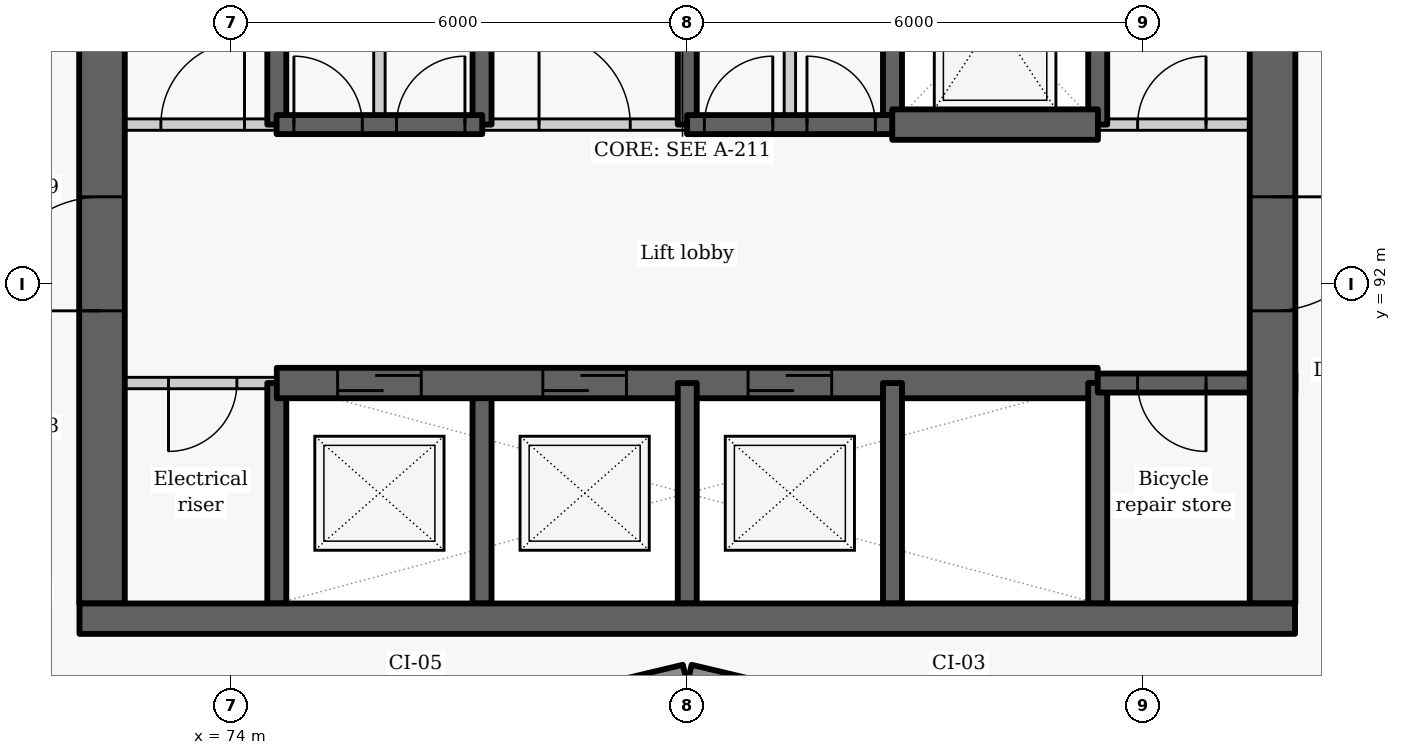
"""IFC4 building model, lengths in metres.
Left out: names, types, materials, properties, quantities, classifications, styles, units other than length and angle.
Written with IfcOpenShell. Run it as: python <this file> out.ifc"""

import sys

from ifc_helpers import new_model, si_unit, direction, frame, frame_2d, origin, place, context, subcontext, project, spatial, rectangle, extrude, element, fill, save


model = new_model("IFC4")
c1 = context("Model", 3, precision=1e-05, world=origin(), true_north=direction((0.0, 1.0)))
c2 = subcontext(c1, "Body", "Model", "MODEL_VIEW")
j1 = project(units=[si_unit("LENGTHUNIT", "METRE"), si_unit("PLANEANGLEUNIT", "RADIAN")], contexts=[c1])
p1 = place(None, origin())
s1 = spatial("IfcSite", under=j1, at=p1, CompositionType="ELEMENT")
p2 = place(p1, origin())
s2 = spatial("IfcBuilding", under=s1, at=p2, CompositionType="ELEMENT")
p3 = place(p2, frame((0.0, 0.0, 41.4)))
s3 = spatial("IfcBuildingStorey", under=s2, at=p3, CompositionType="ELEMENT", Elevation=41.4)
for number, where, z_axis, x_axis in (
    (1, (76.814, 86.119, 0.0), (0.0, 0.0, 1.0), (0.973, 0.232, 0.0)),
    (2, (80.029, 86.872, 0.0), (0.0, 0.0, 1.0), (0.973, -0.232, 0.0)),
):
    element("IfcWall", number, at=place(p3, frame(where, z_axis=z_axis, x_axis=x_axis)), inside=s3, PredefinedType="SOLIDWALL", context=c2, shape_type="SweptSolid", body=[
        extrude(rectangle(XDim=3.246, YDim=0.25, at=frame_2d((1.623, 0.0))), origin(), (0.0, 0.0, 1.0), 2.425),
    ])
p4 = place(p3, frame((74.6, 87.8, -0.275), z_axis=(0.0, 0.0, 1.0), x_axis=(0.0, 1.0, 0.0)))
e3 = element("IfcWall", 3, at=p4, inside=s3, PredefinedType="SHEAR", context=c2, shape_type="SweptSolid", body=[
    extrude(rectangle(XDim=2.9, YDim=0.25, at=frame_2d((1.45, 0.0))), origin(), (0.0, 0.0, 1.0), 3.3),
])
p5 = place(p3, frame((74.6, 94.1, -0.275), z_axis=(0.0, 0.0, 1.0), x_axis=(0.0, 1.0, 0.0)))
e4 = element("IfcWall", 4, at=p5, inside=s3, PredefinedType="SHEAR", context=c2, shape_type="SweptSolid", body=[
    extrude(rectangle(XDim=2.8, YDim=0.25, at=frame_2d((1.4, 0.0))), origin(), (0.0, 0.0, 1.0), 3.3),
])
p6 = place(p3, frame((74.6, 90.7, 0.0), z_axis=(0.0, 0.0, 1.0), x_axis=(-1.0, 0.0, 0.0)))
e5 = element("IfcWall", 5, at=p6, inside=s3, PredefinedType="PARTITIONING", context=c2, shape_type="SweptSolid", body=[
    extrude(rectangle(XDim=2.6, YDim=0.15, at=frame_2d((1.3, 0.0))), origin(), (0.0, 0.0, 1.0), 3.025),
])
p7 = place(p6, frame((0.525, 0.0, 0.0)))
e6 = element("IfcOpeningElement", 6, at=p7, cuts=e5, PredefinedType="OPENING", context=c2, shape_type="SweptSolid", body=[
    extrude(rectangle(XDim=0.9, YDim=2.1, at=frame_2d((0.45, 1.05))), frame((0.0, 0.085, 0.0), z_axis=(0.0, -1.0, 0.0), x_axis=(1.0, 0.0, 0.0)), (0.0, 0.0, 1.0), 0.17),
])
p8 = place(p3, frame((72.3, 87.8, -0.275), z_axis=(0.0, 0.0, 1.0), x_axis=(0.0, 1.0, 0.0)))
e7 = element("IfcWall", 7, at=p8, inside=s3, PredefinedType="SHEAR", context=c2, shape_type="SweptSolid", body=[
    extrude(rectangle(XDim=9.1, YDim=0.6, at=frame_2d((4.55, 0.0))), origin(), (0.0, 0.0, 1.0), 3.3),
])
p9 = place(p8, frame((3.85, 0.0, 0.275)))
e8 = element("IfcOpeningElement", 8, at=p9, cuts=e7, PredefinedType="OPENING", context=c2, shape_type="SweptSolid", body=[
    extrude(rectangle(XDim=1.5, YDim=2.1, at=frame_2d((0.75, 1.05))), frame((0.0, 0.31, 0.0), z_axis=(0.0, -1.0, 0.0), x_axis=(1.0, 0.0, 0.0)), (0.0, 0.0, 1.0), 0.62),
])
p10 = place(p3, frame((77.3, 87.8, -0.275), z_axis=(0.0, 0.0, 1.0), x_axis=(0.0, 1.0, 0.0)))
e9 = element("IfcWall", 9, at=p10, inside=s3, PredefinedType="SHEAR", context=c2, shape_type="SweptSolid", body=[
    extrude(rectangle(XDim=2.9, YDim=0.25, at=frame_2d((1.45, 0.0))), origin(), (0.0, 0.0, 1.0), 3.3),
])
p11 = place(p3, frame((77.3, 94.1, -0.275), z_axis=(0.0, 0.0, 1.0), x_axis=(0.0, 1.0, 0.0)))
e10 = element("IfcWall", 10, at=p11, inside=s3, PredefinedType="SHEAR", context=c2, shape_type="SweptSolid", body=[
    extrude(rectangle(XDim=2.8, YDim=0.25, at=frame_2d((1.4, 0.0))), origin(), (0.0, 0.0, 1.0), 3.3),
])
p12 = place(p3, frame((74.6, 90.7, -0.275), z_axis=(0.0, 0.0, 1.0), x_axis=(1.0, 0.0, 0.0)))
e11 = element("IfcWall", 11, at=p12, inside=s3, PredefinedType="SHEAR", context=c2, shape_type="SweptSolid", body=[
    extrude(rectangle(XDim=10.8, YDim=0.4, at=frame_2d((5.4, 0.0))), origin(), (0.0, 0.0, 1.0), 3.3),
])
p13 = place(p12, frame((0.8, 0.0, 0.275)))
e12 = element("IfcOpeningElement", 12, at=p13, cuts=e11, PredefinedType="OPENING", context=c2, shape_type="SweptSolid", body=[
    extrude(rectangle(XDim=1.1, YDim=2.1, at=frame_2d((0.55, 1.05))), frame((0.0, 0.21, 0.0), z_axis=(0.0, -1.0, 0.0), x_axis=(1.0, 0.0, 0.0)), (0.0, 0.0, 1.0), 0.42),
])
p14 = place(p12, frame((3.5, 0.0, 0.275)))
e13 = element("IfcOpeningElement", 13, at=p14, cuts=e11, PredefinedType="OPENING", context=c2, shape_type="SweptSolid", body=[
    extrude(rectangle(XDim=1.1, YDim=2.1, at=frame_2d((0.55, 1.05))), frame((0.0, 0.21, 0.0), z_axis=(0.0, -1.0, 0.0), x_axis=(1.0, 0.0, 0.0)), (0.0, 0.0, 1.0), 0.42),
])
p15 = place(p12, frame((6.2, 0.0, 0.275)))
e14 = element("IfcOpeningElement", 14, at=p15, cuts=e11, PredefinedType="OPENING", context=c2, shape_type="SweptSolid", body=[
    extrude(rectangle(XDim=1.1, YDim=2.1, at=frame_2d((0.55, 1.05))), frame((0.0, 0.21, 0.0), z_axis=(0.0, -1.0, 0.0), x_axis=(1.0, 0.0, 0.0)), (0.0, 0.0, 1.0), 0.42),
])
p16 = place(p3, frame((80.0, 87.8, -0.275), z_axis=(0.0, 0.0, 1.0), x_axis=(0.0, 1.0, 0.0)))
e15 = element("IfcWall", 15, at=p16, inside=s3, PredefinedType="SHEAR", context=c2, shape_type="SweptSolid", body=[
    extrude(rectangle(XDim=2.9, YDim=0.25, at=frame_2d((1.45, 0.0))), origin(), (0.0, 0.0, 1.0), 3.3),
])
p17 = place(p3, frame((80.0, 94.1, -0.275), z_axis=(0.0, 0.0, 1.0), x_axis=(0.0, 1.0, 0.0)))
e16 = element("IfcWall", 16, at=p17, inside=s3, PredefinedType="SHEAR", context=c2, shape_type="SweptSolid", body=[
    extrude(rectangle(XDim=2.8, YDim=0.25, at=frame_2d((1.4, 0.0))), origin(), (0.0, 0.0, 1.0), 3.3),
])
p18 = place(p3, frame((82.7, 87.8, -0.275), z_axis=(0.0, 0.0, 1.0), x_axis=(0.0, 1.0, 0.0)))
e17 = element("IfcWall", 17, at=p18, inside=s3, PredefinedType="SHEAR", context=c2, shape_type="SweptSolid", body=[
    extrude(rectangle(XDim=2.9, YDim=0.25, at=frame_2d((1.45, 0.0))), origin(), (0.0, 0.0, 1.0), 3.3),
])
p19 = place(p3, frame((82.7, 94.1, -0.275), z_axis=(0.0, 0.0, 1.0), x_axis=(0.0, 1.0, 0.0)))
e18 = element("IfcWall", 18, at=p19, inside=s3, PredefinedType="SHEAR", context=c2, shape_type="SweptSolid", body=[
    extrude(rectangle(XDim=2.8, YDim=0.25, at=frame_2d((1.4, 0.0))), origin(), (0.0, 0.0, 1.0), 3.3),
])
p20 = place(p3, frame((85.4, 87.8, -0.275), z_axis=(0.0, 0.0, 1.0), x_axis=(0.0, 1.0, 0.0)))
e19 = element("IfcWall", 19, at=p20, inside=s3, PredefinedType="SHEAR", context=c2, shape_type="SweptSolid", body=[
    extrude(rectangle(XDim=2.9, YDim=0.25, at=frame_2d((1.45, 0.0))), origin(), (0.0, 0.0, 1.0), 3.3),
])
p21 = place(p3, frame((85.4, 94.1, -0.275), z_axis=(0.0, 0.0, 1.0), x_axis=(0.0, 1.0, 0.0)))
e20 = element("IfcWall", 20, at=p21, inside=s3, PredefinedType="SHEAR", context=c2, shape_type="SweptSolid", body=[
    extrude(rectangle(XDim=2.8, YDim=0.25, at=frame_2d((1.4, 0.0))), origin(), (0.0, 0.0, 1.0), 3.3),
])
p22 = place(p3, frame((88.0, 90.7, -0.275), z_axis=(0.0, 0.0, 1.0), x_axis=(-1.0, 0.0, 0.0)))
e21 = element("IfcWall", 21, at=p22, inside=s3, PredefinedType="SHEAR", context=c2, shape_type="SweptSolid", body=[
    extrude(rectangle(XDim=2.6, YDim=0.25, at=frame_2d((1.3, 0.0))), origin(), (0.0, 0.0, 1.0), 3.3),
])
p23 = place(p22, frame((1.175, 0.0, 0.275)))
e22 = element("IfcOpeningElement", 22, at=p23, cuts=e21, PredefinedType="OPENING", context=c2, shape_type="SweptSolid", body=[
    extrude(rectangle(XDim=0.9, YDim=2.1, at=frame_2d((0.45, 1.05))), frame((0.0, 0.135, 0.0), z_axis=(0.0, -1.0, 0.0), x_axis=(1.0, 0.0, 0.0)), (0.0, 0.0, 1.0), 0.27),
])
p24 = place(p3, frame((87.7, 103.4, -0.275), z_axis=(0.0, 0.0, 1.0), x_axis=(0.0, -1.0, 0.0)))
e23 = element("IfcWall", 23, at=p24, inside=s3, PredefinedType="SHEAR", context=c2, shape_type="SweptSolid", body=[
    extrude(rectangle(XDim=15.6, YDim=0.6, at=frame_2d((7.8, 0.0))), origin(), (0.0, 0.0, 1.0), 3.3),
])
p25 = place(p24, frame((10.25, 0.0, 0.275)))
e24 = element("IfcOpeningElement", 24, at=p25, cuts=e23, PredefinedType="OPENING", context=c2, shape_type="SweptSolid", body=[
    extrude(rectangle(XDim=1.5, YDim=2.1, at=frame_2d((0.75, 1.05))), frame((0.0, 0.31, 0.0), z_axis=(0.0, -1.0, 0.0), x_axis=(1.0, 0.0, 0.0)), (0.0, 0.0, 1.0), 0.62),
])
p26 = place(p24, frame((2.7, 0.0, 0.275)))
e25 = element("IfcOpeningElement", 25, at=p26, cuts=e23, PredefinedType="OPENING", context=c2, shape_type="SweptSolid", body=[
    extrude(rectangle(XDim=1.1, YDim=2.1, at=frame_2d((0.55, 1.05))), frame((0.0, 0.31, 0.0), z_axis=(0.0, -1.0, 0.0), x_axis=(1.0, 0.0, 0.0)), (0.0, 0.0, 1.0), 0.62),
])
p27 = place(p3, frame((72.0, 94.1, 0.0), z_axis=(0.0, 0.0, 1.0), x_axis=(1.0, 0.0, 0.0)))
e26 = element("IfcWall", 26, at=p27, inside=s3, PredefinedType="PARTITIONING", context=c2, shape_type="SweptSolid", body=[
    extrude(rectangle(XDim=2.603, YDim=0.15, at=frame_2d((1.302, 0.0))), origin(), (0.0, 0.0, 1.0), 3.025),
])
p28 = place(p27, frame((1.075, 0.0, 0.0)))
e27 = element("IfcOpeningElement", 27, at=p28, cuts=e26, PredefinedType="OPENING", context=c2, shape_type="SweptSolid", body=[
    extrude(rectangle(XDim=1.1, YDim=2.1, at=frame_2d((0.55, 1.05))), frame((0.0, 0.085, 0.0), z_axis=(0.0, -1.0, 0.0), x_axis=(1.0, 0.0, 0.0)), (0.0, 0.0, 1.0), 0.17),
])
p29 = place(p3, frame((77.297, 94.1, 0.0), z_axis=(0.0, 0.0, 1.0), x_axis=(1.0, 0.0, 0.0)))
e28 = element("IfcWall", 28, at=p29, inside=s3, PredefinedType="PARTITIONING", context=c2, shape_type="SweptSolid", body=[
    extrude(rectangle(XDim=2.706, YDim=0.15, at=frame_2d((1.353, 0.0))), origin(), (0.0, 0.0, 1.0), 3.025),
])
p30 = place(p29, frame((0.753, 0.0, 0.0)))
e29 = element("IfcOpeningElement", 29, at=p30, cuts=e28, PredefinedType="OPENING", context=c2, shape_type="SweptSolid", body=[
    extrude(rectangle(XDim=1.2, YDim=2.1, at=frame_2d((0.6, 1.05))), frame((0.0, 0.085, 0.0), z_axis=(0.0, -1.0, 0.0), x_axis=(1.0, 0.0, 0.0)), (0.0, 0.0, 1.0), 0.17),
])
p31 = place(p3, frame((85.397, 94.1, 0.0), z_axis=(0.0, 0.0, 1.0), x_axis=(1.0, 0.0, 0.0)))
e30 = element("IfcWall", 30, at=p31, inside=s3, PredefinedType="PARTITIONING", context=c2, shape_type="SweptSolid", body=[
    extrude(rectangle(XDim=2.603, YDim=0.15, at=frame_2d((1.302, 0.0))), origin(), (0.0, 0.0, 1.0), 3.025),
])
p32 = place(p31, frame((0.528, 0.0, 0.0)))
e31 = element("IfcOpeningElement", 31, at=p32, cuts=e30, PredefinedType="OPENING", context=c2, shape_type="SweptSolid", body=[
    extrude(rectangle(XDim=0.9, YDim=2.1, at=frame_2d((0.45, 1.05))), frame((0.0, 0.085, 0.0), z_axis=(0.0, -1.0, 0.0), x_axis=(1.0, 0.0, 0.0)), (0.0, 0.0, 1.0), 0.17),
])
p33 = place(p3, frame((74.597, 94.1, -0.275), z_axis=(0.0, 0.0, 1.0), x_axis=(1.0, 0.0, 0.0)))
e32 = element("IfcWall", 32, at=p33, inside=s3, PredefinedType="SHEAR", context=c2, shape_type="SweptSolid", body=[
    extrude(rectangle(XDim=2.706, YDim=0.25, at=frame_2d((1.353, 0.0))), origin(), (0.0, 0.0, 1.0), 3.3),
])
p34 = place(p33, frame((0.228, 0.0, 0.275)))
e33 = element("IfcOpeningElement", 33, at=p34, cuts=e32, PredefinedType="OPENING", context=c2, shape_type="SweptSolid", body=[
    extrude(rectangle(XDim=0.9, YDim=2.1, at=frame_2d((0.45, 1.05))), frame((0.0, 0.135, 0.0), z_axis=(0.0, -1.0, 0.0), x_axis=(1.0, 0.0, 0.0)), (0.0, 0.0, 1.0), 0.27),
])
p35 = place(p33, frame((1.578, 0.0, 0.275)))
e34 = element("IfcOpeningElement", 34, at=p35, cuts=e32, PredefinedType="OPENING", context=c2, shape_type="SweptSolid", body=[
    extrude(rectangle(XDim=0.9, YDim=2.1, at=frame_2d((0.45, 1.05))), frame((0.0, 0.135, 0.0), z_axis=(0.0, -1.0, 0.0), x_axis=(1.0, 0.0, 0.0)), (0.0, 0.0, 1.0), 0.27),
])
p36 = place(p3, frame((79.997, 94.1, -0.275), z_axis=(0.0, 0.0, 1.0), x_axis=(1.0, 0.0, 0.0)))
e35 = element("IfcWall", 35, at=p36, inside=s3, PredefinedType="SHEAR", context=c2, shape_type="SweptSolid", body=[
    extrude(rectangle(XDim=2.706, YDim=0.25, at=frame_2d((1.353, 0.0))), origin(), (0.0, 0.0, 1.0), 3.3),
])
p37 = place(p36, frame((0.228, 0.0, 0.275)))
e36 = element("IfcOpeningElement", 36, at=p37, cuts=e35, PredefinedType="OPENING", context=c2, shape_type="SweptSolid", body=[
    extrude(rectangle(XDim=0.9, YDim=2.1, at=frame_2d((0.45, 1.05))), frame((0.0, 0.135, 0.0), z_axis=(0.0, -1.0, 0.0), x_axis=(1.0, 0.0, 0.0)), (0.0, 0.0, 1.0), 0.27),
])
p38 = place(p36, frame((1.578, 0.0, 0.275)))
e37 = element("IfcOpeningElement", 37, at=p38, cuts=e35, PredefinedType="OPENING", context=c2, shape_type="SweptSolid", body=[
    extrude(rectangle(XDim=0.9, YDim=2.1, at=frame_2d((0.45, 1.05))), frame((0.0, 0.135, 0.0), z_axis=(0.0, -1.0, 0.0), x_axis=(1.0, 0.0, 0.0)), (0.0, 0.0, 1.0), 0.27),
])
p39 = place(p3, frame((82.697, 94.1, -0.275), z_axis=(0.0, 0.0, 1.0), x_axis=(1.0, 0.0, 0.0)))
e38 = element("IfcWall", 38, at=p39, inside=s3, PredefinedType="SHEAR", context=c2, shape_type="SweptSolid", body=[
    extrude(rectangle(XDim=2.706, YDim=0.4, at=frame_2d((1.353, 0.0))), origin(), (0.0, 0.0, 1.0), 3.3),
])
for number, where, z_axis, x_axis in (
    (39, (75.95, 94.1, 0.0), (0.0, 0.0, 1.0), (0.0, 1.0, 0.0)),
    (40, (81.35, 94.1, 0.0), (0.0, 0.0, 1.0), (0.0, 1.0, 0.0)),
):
    element("IfcWall", number, at=place(p3, frame(where, z_axis=z_axis, x_axis=x_axis)), inside=s3, PredefinedType="PARTITIONING", context=c2, shape_type="SweptSolid", body=[
        extrude(rectangle(XDim=2.8, YDim=0.15, at=frame_2d((1.4, 0.0))), origin(), (0.0, 0.0, 1.0), 3.025),
    ])
p40 = place(p3, frame((72.004, 87.6, -0.275), z_axis=(0.0, 0.0, 1.0), x_axis=(1.0, 0.0, 0.0)))
e41 = element("IfcWall", 41, at=p40, inside=s3, PredefinedType="SHEAR", context=c2, shape_type="SweptSolid", body=[
    extrude(rectangle(XDim=15.992, YDim=0.4, at=frame_2d((7.996, 0.0))), origin(), (0.0, 0.0, 1.0), 3.3),
])
p41 = place(p7, origin())
e42 = element("IfcDoor", 42, at=p41, inside=s3, OperationType="SINGLE_SWING_RIGHT", PredefinedType="DOOR", context=c2, shape_type="SweptSolid", body=[
    extrude(rectangle(XDim=0.9, YDim=2.1, at=frame_2d((0.45, 1.05))), frame((0.0, 0.025, 0.0), z_axis=(0.0, -1.0, 0.0), x_axis=(1.0, 0.0, 0.0)), (0.0, 0.0, 1.0), 0.05),
])
fill(e6, e42)
p42 = place(p13, origin())
e43 = element("IfcDoor", 43, at=p42, inside=s3, OperationType="SLIDING_TO_LEFT", PredefinedType="DOOR", context=c2, shape_type="SweptSolid", body=[
    extrude(rectangle(XDim=1.1, YDim=2.1, at=frame_2d((0.55, 1.05))), frame((0.0, 0.025, 0.0), z_axis=(0.0, -1.0, 0.0), x_axis=(1.0, 0.0, 0.0)), (0.0, 0.0, 1.0), 0.05),
])
fill(e12, e43)
p43 = place(p14, origin())
e44 = element("IfcDoor", 44, at=p43, inside=s3, OperationType="SLIDING_TO_LEFT", PredefinedType="DOOR", context=c2, shape_type="SweptSolid", body=[
    extrude(rectangle(XDim=1.1, YDim=2.1, at=frame_2d((0.55, 1.05))), frame((0.0, 0.025, 0.0), z_axis=(0.0, -1.0, 0.0), x_axis=(1.0, 0.0, 0.0)), (0.0, 0.0, 1.0), 0.05),
])
fill(e13, e44)
p44 = place(p15, origin())
e45 = element("IfcDoor", 45, at=p44, inside=s3, OperationType="SLIDING_TO_LEFT", PredefinedType="DOOR", context=c2, shape_type="SweptSolid", body=[
    extrude(rectangle(XDim=1.1, YDim=2.1, at=frame_2d((0.55, 1.05))), frame((0.0, 0.025, 0.0), z_axis=(0.0, -1.0, 0.0), x_axis=(1.0, 0.0, 0.0)), (0.0, 0.0, 1.0), 0.05),
])
fill(e14, e45)
p45 = place(p23, origin())
e46 = element("IfcDoor", 46, at=p45, inside=s3, OperationType="SINGLE_SWING_LEFT", PredefinedType="DOOR", context=c2, shape_type="SweptSolid", body=[
    extrude(rectangle(XDim=0.9, YDim=2.1, at=frame_2d((0.45, 1.05))), frame((0.0, 0.025, 0.0), z_axis=(0.0, -1.0, 0.0), x_axis=(1.0, 0.0, 0.0)), (0.0, 0.0, 1.0), 0.05),
])
fill(e22, e46)
p46 = place(p28, origin())
e47 = element("IfcDoor", 47, at=p46, inside=s3, OperationType="SINGLE_SWING_RIGHT", PredefinedType="DOOR", context=c2, shape_type="SweptSolid", body=[
    extrude(rectangle(XDim=1.1, YDim=2.1, at=frame_2d((0.55, 1.05))), frame((0.0, 0.025, 0.0), z_axis=(0.0, -1.0, 0.0), x_axis=(1.0, 0.0, 0.0)), (0.0, 0.0, 1.0), 0.05),
])
fill(e27, e47)
p47 = place(p34, origin())
e48 = element("IfcDoor", 48, at=p47, inside=s3, OperationType="SINGLE_SWING_LEFT", PredefinedType="DOOR", context=c2, shape_type="SweptSolid", body=[
    extrude(rectangle(XDim=0.9, YDim=2.1, at=frame_2d((0.45, 1.05))), frame((0.0, 0.025, 0.0), z_axis=(0.0, -1.0, 0.0), x_axis=(1.0, 0.0, 0.0)), (0.0, 0.0, 1.0), 0.05),
])
fill(e33, e48)
p48 = place(p35, origin())
e49 = element("IfcDoor", 49, at=p48, inside=s3, OperationType="SINGLE_SWING_RIGHT", PredefinedType="DOOR", context=c2, shape_type="SweptSolid", body=[
    extrude(rectangle(XDim=0.9, YDim=2.1, at=frame_2d((0.45, 1.05))), frame((0.0, 0.025, 0.0), z_axis=(0.0, -1.0, 0.0), x_axis=(1.0, 0.0, 0.0)), (0.0, 0.0, 1.0), 0.05),
])
fill(e34, e49)
p49 = place(p30, origin())
e50 = element("IfcDoor", 50, at=p49, inside=s3, OperationType="DOUBLE_DOOR_SINGLE_SWING", PredefinedType="DOOR", context=c2, shape_type="SweptSolid", body=[
    extrude(rectangle(XDim=1.2, YDim=2.1, at=frame_2d((0.6, 1.05))), frame((0.0, 0.025, 0.0), z_axis=(0.0, -1.0, 0.0), x_axis=(1.0, 0.0, 0.0)), (0.0, 0.0, 1.0), 0.05),
])
fill(e29, e50)
p50 = place(p37, origin())
e51 = element("IfcDoor", 51, at=p50, inside=s3, OperationType="SINGLE_SWING_RIGHT", PredefinedType="DOOR", context=c2, shape_type="SweptSolid", body=[
    extrude(rectangle(XDim=0.9, YDim=2.1, at=frame_2d((0.45, 1.05))), frame((0.0, 0.025, 0.0), z_axis=(0.0, -1.0, 0.0), x_axis=(1.0, 0.0, 0.0)), (0.0, 0.0, 1.0), 0.05),
])
fill(e36, e51)
p51 = place(p38, origin())
e52 = element("IfcDoor", 52, at=p51, inside=s3, OperationType="SINGLE_SWING_LEFT", PredefinedType="DOOR", context=c2, shape_type="SweptSolid", body=[
    extrude(rectangle(XDim=0.9, YDim=2.1, at=frame_2d((0.45, 1.05))), frame((0.0, 0.025, 0.0), z_axis=(0.0, -1.0, 0.0), x_axis=(1.0, 0.0, 0.0)), (0.0, 0.0, 1.0), 0.05),
])
fill(e37, e52)
p52 = place(p32, origin())
e53 = element("IfcDoor", 53, at=p52, inside=s3, OperationType="SINGLE_SWING_RIGHT", PredefinedType="DOOR", context=c2, shape_type="SweptSolid", body=[
    extrude(rectangle(XDim=0.9, YDim=2.1, at=frame_2d((0.45, 1.05))), frame((0.0, 0.025, 0.0), z_axis=(0.0, -1.0, 0.0), x_axis=(1.0, 0.0, 0.0)), (0.0, 0.0, 1.0), 0.05),
])
fill(e31, e53)
p53 = place(p25, origin())
e54 = element("IfcDoor", 54, at=p53, inside=s3, OperationType="DOUBLE_DOOR_SINGLE_SWING", PredefinedType="DOOR", context=c2, shape_type="SweptSolid", body=[
    extrude(rectangle(XDim=1.5, YDim=2.1, at=frame_2d((0.75, 1.05))), frame((0.0, 0.025, 0.0), z_axis=(0.0, -1.0, 0.0), x_axis=(1.0, 0.0, 0.0)), (0.0, 0.0, 1.0), 0.05),
])
fill(e24, e54)
p54 = place(p9, origin())
e55 = element("IfcDoor", 55, at=p54, inside=s3, OperationType="DOUBLE_DOOR_SINGLE_SWING", PredefinedType="DOOR", context=c2, shape_type="SweptSolid", body=[
    extrude(rectangle(XDim=1.5, YDim=2.1, at=frame_2d((0.75, 1.05))), frame((0.0, 0.025, 0.0), z_axis=(0.0, -1.0, 0.0), x_axis=(1.0, 0.0, 0.0)), (0.0, 0.0, 1.0), 0.05),
])
fill(e8, e55)
save(model, sys.argv[1])
